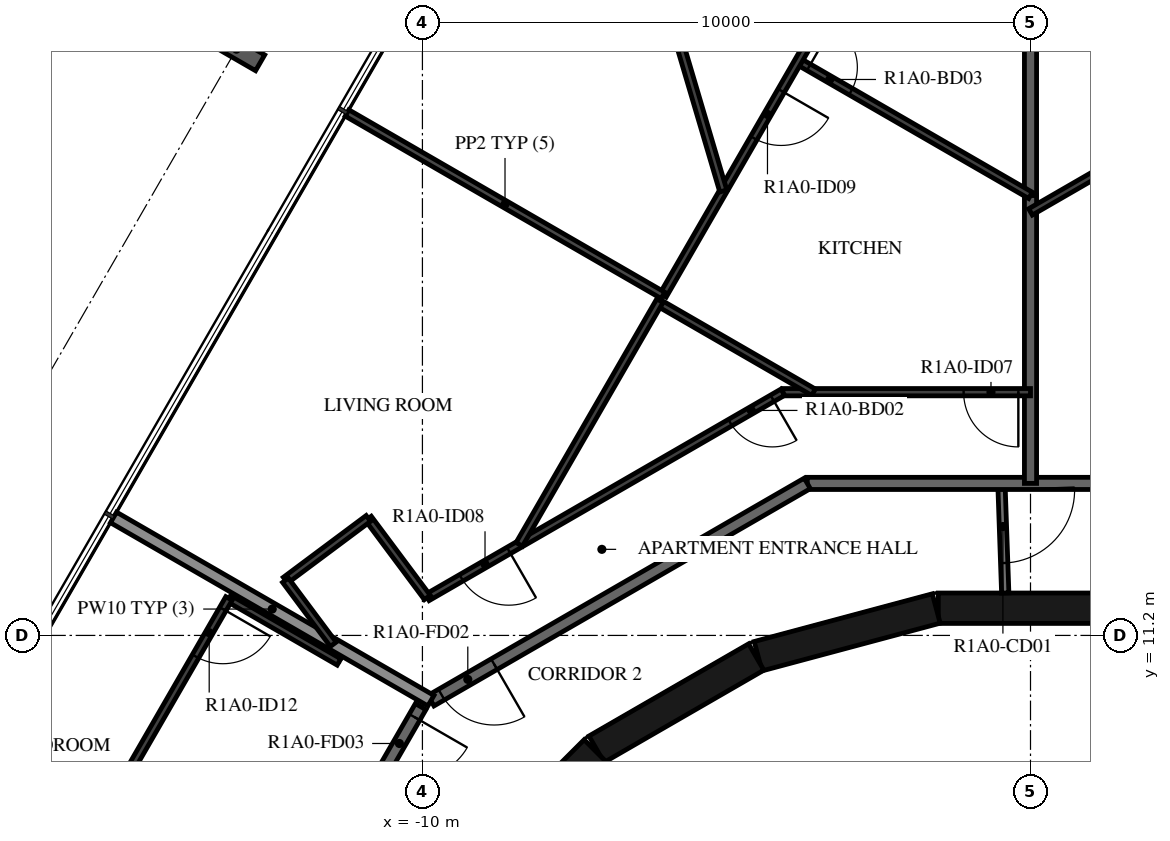
"""IFC4 building model, lengths in metres.
Left out: names, types, materials, properties, quantities, classifications, styles, units other than length and angle.
Written with IfcOpenShell. Run it as: python <this file> out.ifc"""

import sys

from ifc_helpers import new_model, si_unit, direction, frame, frame_2d, origin, origin_2d, place, context, subcontext, project, spatial, rectangle, i_section, extrude, element, fill, save


model = new_model("IFC4")
c1 = context("Model", 3, precision=1e-05, world=origin(), true_north=direction((0.0, 1.0)))
c2 = subcontext(c1, "Body", "Model", "MODEL_VIEW")
j1 = project(units=[si_unit("LENGTHUNIT", "METRE"), si_unit("PLANEANGLEUNIT", "RADIAN")], contexts=[c1])
p1 = place(None, origin())
s1 = spatial("IfcSite", under=j1, at=p1, CompositionType="ELEMENT")
p2 = place(p1, origin())
s2 = spatial("IfcBuilding", under=s1, at=p2, CompositionType="ELEMENT")
p3 = place(p2, frame((0.0, 0.0, 38.4)))
s3 = spatial("IfcBuildingStorey", under=s2, at=p3, CompositionType="ELEMENT", Elevation=38.4)
p4 = place(p3, frame((-13.059, 20.842, -0.45), z_axis=(0.0, 0.0, 1.0), x_axis=(0.50000017485, 0.866025302835, 0.0)))
e1 = element("IfcColumn", 1, at=p4, inside=s3, PredefinedType="COLUMN", context=c2, shape_type="SweptSolid", body=[
    extrude(i_section(OverallWidth=0.3, OverallDepth=0.9, WebThickness=0.019, FlangeThickness=0.035, FilletRadius=0.03, at=origin_2d()), origin(), (0.0, 0.0, 1.0), 3.57),
])
for number, where, z_axis, x_axis in (
    (2, (1.516, 11.647, 0.0), (0.0, 0.0, 1.0), (-1.0, 0.0, 0.0)),
    (3, (-1.55, 11.643, 0.0), (0.0, 0.0, 1.0), (-0.966, -0.259, 0.0)),
    (4, (-4.51, 10.845, 0.0), (0.0, 0.0, 1.0), (-0.866, -0.5, 0.0)),
):
    element("IfcWall", number, at=place(p3, frame(where, z_axis=z_axis, x_axis=x_axis)), inside=s3, PredefinedType="SHEAR", context=c2, shape_type="SweptSolid", body=[
        extrude(rectangle(XDim=3.033, YDim=0.5, at=frame_2d((1.516, 0.0))), origin(), (0.0, 0.0, 1.0), 3.12),
    ])
p5 = place(p3, frame((-7.164, 9.308, 0.0), z_axis=(0.0, 0.0, 1.0), x_axis=(-0.707106781187, -0.707106781187, 0.0)))
e5 = element("IfcWall", 5, at=p5, inside=s3, PredefinedType="SHEAR", context=c2, shape_type="SweptSolid", body=[
    extrude(rectangle(XDim=3.032, YDim=0.5, at=frame_2d((1.516, 0.0))), origin(), (0.0, 0.0, 1.0), 3.12),
])
p6 = place(p5, frame((1.416, 0.0, 0.0)))
e6 = element("IfcOpeningElement", 6, at=p6, cuts=e5, PredefinedType="OPENING", context=c2, shape_type="SweptSolid", body=[
    extrude(rectangle(XDim=1.2, YDim=2.1, at=frame_2d((0.6, 1.05))), frame((0.0, 0.26, 0.0), z_axis=(0.0, -1.0, 0.0), x_axis=(1.0, 0.0, 0.0)), (0.0, 0.0, 1.0), 0.52),
])
p7 = place(p3, frame((-0.479, 13.7, 0.0), z_axis=(0.0, 0.0, 1.0), x_axis=(0.034919103017, -0.999390142159, 0.0)))
e7 = element("IfcWall", 7, at=p7, inside=s3, PredefinedType="PARTITIONING", context=c2, shape_type="SweptSolid", body=[
    extrude(rectangle(XDim=1.804, YDim=0.12, at=frame_2d((0.902, 0.0))), origin(), (0.0, 0.0, 1.0), 3.12),
])
p8 = place(p7, frame((0.11, 0.0, 0.0)))
e8 = element("IfcOpeningElement", 8, at=p8, cuts=e7, PredefinedType="OPENING", context=c2, shape_type="SweptSolid", body=[
    extrude(rectangle(XDim=1.2, YDim=2.1, at=frame_2d((0.6, 1.05))), frame((0.0, 0.07, 0.0), z_axis=(0.0, -1.0, 0.0), x_axis=(1.0, 0.0, 0.0)), (0.0, 0.0, 1.0), 0.14),
])
p9 = place(p3, frame((3.671, 13.7, 0.0), z_axis=(0.0, 0.0, 1.0), x_axis=(-1.0, 0.0, 0.0)))
e9 = element("IfcWall", 9, at=p9, inside=s3, PredefinedType="STANDARD", context=c2, shape_type="SweptSolid", body=[
    extrude(rectangle(XDim=7.342, YDim=0.2, at=frame_2d((3.671, 0.0))), origin(), (0.0, 0.0, 1.0), 3.12),
])
p10 = place(p3, frame((-3.671, 13.7, 0.0), z_axis=(0.0, 0.0, 1.0), x_axis=(-0.866031419417, -0.499989580474, 0.0)))
e10 = element("IfcWall", 10, at=p10, inside=s3, PredefinedType="STANDARD", context=c2, shape_type="SweptSolid", body=[
    extrude(rectangle(XDim=7.147, YDim=0.2, at=frame_2d((3.573, 0.0))), origin(), (0.0, 0.0, 1.0), 3.12),
])
p11 = place(p10, frame((5.947, 0.0, 0.0)))
e11 = element("IfcOpeningElement", 11, at=p11, cuts=e10, PredefinedType="OPENING", context=c2, shape_type="SweptSolid", body=[
    extrude(rectangle(XDim=1.0, YDim=2.1, at=frame_2d((0.5, 1.05))), frame((0.0, 0.11, 0.0), z_axis=(0.0, -1.0, 0.0), x_axis=(1.0, 0.0, 0.0)), (0.0, 0.0, 1.0), 0.22),
])
p12 = place(p3, frame((-10.029, 10.029, 0.0), z_axis=(0.0, 0.0, 1.0), x_axis=(-0.500001669485, -0.866024439905, 0.0)))
e12 = element("IfcWall", 12, at=p12, inside=s3, PredefinedType="STANDARD", context=c2, shape_type="SweptSolid", body=[
    extrude(rectangle(XDim=7.342, YDim=0.2, at=frame_2d((3.671, 0.0))), origin(), (0.0, 0.0, 1.0), 3.12),
])
p13 = place(p12, frame((0.2, 0.0, 0.0)))
e13 = element("IfcOpeningElement", 13, at=p13, cuts=e12, PredefinedType="OPENING", context=c2, shape_type="SweptSolid", body=[
    extrude(rectangle(XDim=1.0, YDim=2.1, at=frame_2d((0.5, 1.05))), frame((0.0, 0.11, 0.0), z_axis=(0.0, -1.0, 0.0), x_axis=(1.0, 0.0, 0.0)), (0.0, 0.0, 1.0), 0.22),
])
p14 = place(p3, frame((0.0, 18.437, 0.0), z_axis=(0.0, 0.0, 1.0), x_axis=(0.0, -1.0, 0.0)))
e14 = element("IfcWall", 14, at=p14, inside=s3, PredefinedType="STANDARD", context=c2, shape_type="SweptSolid", body=[
    extrude(rectangle(XDim=4.737, YDim=0.2, at=frame_2d((2.368, 0.0))), origin(), (0.0, 0.0, 1.0), 3.12),
])
p15 = place(p3, frame((0.0, 21.81, 0.0), z_axis=(0.0, 0.0, 1.0), x_axis=(0.0, -1.0, 0.0)))
e15 = element("IfcWall", 15, at=p15, inside=s3, PredefinedType="STANDARD", context=c2, shape_type="SweptSolid", body=[
    extrude(rectangle(XDim=3.373, YDim=0.2, at=frame_2d((1.687, 0.0))), origin(), (0.0, 0.0, 1.0), 3.12),
])
p16 = place(p3, frame((-15.08, 13.14, 0.0), z_axis=(0.0, 0.0, 1.0), x_axis=(0.86603112331, -0.49999009336, 0.0)))
e16 = element("IfcWall", 16, at=p16, inside=s3, PredefinedType="STANDARD", context=c2, shape_type="SweptSolid", body=[
    extrude(rectangle(XDim=6.027, YDim=0.2, at=frame_2d((3.014, 0.0))), origin(), (0.0, 0.0, 1.0), 2.73),
])
p17 = place(p3, frame((5.324, 21.239, 0.0), z_axis=(0.0, 0.0, 1.0), x_axis=(-0.866030172657, -0.49999173998, 0.0)))
e17 = element("IfcWall", 17, at=p17, inside=s3, PredefinedType="PARTITIONING", context=c2, shape_type="SweptSolid", body=[
    extrude(rectangle(XDim=6.147, YDim=0.12, at=frame_2d((3.074, 0.0))), origin(), (0.0, 0.0, 1.0), 3.12),
])
p18 = place(p17, frame((0.2, 0.0, 0.0)))
e18 = element("IfcOpeningElement", 18, at=p18, cuts=e17, PredefinedType="OPENING", context=c2, shape_type="SweptSolid", body=[
    extrude(rectangle(XDim=0.9, YDim=2.1, at=frame_2d((0.45, 1.05))), frame((0.0, 0.07, 0.0), z_axis=(0.0, -1.0, 0.0), x_axis=(1.0, 0.0, 0.0)), (0.0, 0.0, 1.0), 0.14),
])
p19 = place(p3, frame((0.0, 15.2, 0.0), z_axis=(0.0, 0.0, 1.0), x_axis=(-1.0, 0.0, 0.0)))
e19 = element("IfcWall", 19, at=p19, inside=s3, PredefinedType="PARTITIONING", context=c2, shape_type="SweptSolid", body=[
    extrude(rectangle(XDim=4.073, YDim=0.12, at=frame_2d((2.036, 0.0))), origin(), (0.0, 0.0, 1.0), 3.12),
])
p20 = place(p19, frame((0.2, 0.0, 0.0)))
e20 = element("IfcOpeningElement", 20, at=p20, cuts=e19, PredefinedType="OPENING", context=c2, shape_type="SweptSolid", body=[
    extrude(rectangle(XDim=0.9, YDim=2.1, at=frame_2d((0.45, 1.05))), frame((0.0, 0.07, 0.0), z_axis=(0.0, -1.0, 0.0), x_axis=(1.0, 0.0, 0.0)), (0.0, 0.0, 1.0), 0.14),
])
p21 = place(p3, frame((-4.073, 15.2, 0.0), z_axis=(0.0, 0.0, 1.0), x_axis=(-0.866024802457, -0.500001041529, 0.0)))
e21 = element("IfcWall", 21, at=p21, inside=s3, PredefinedType="PARTITIONING", context=c2, shape_type="SweptSolid", body=[
    extrude(rectangle(XDim=6.751, YDim=0.12, at=frame_2d((3.376, 0.0))), origin(), (0.0, 0.0, 1.0), 3.12),
])
p22 = place(p21, frame((0.2, 0.0, 0.0)))
e22 = element("IfcOpeningElement", 22, at=p22, cuts=e21, PredefinedType="OPENING", context=c2, shape_type="SweptSolid", body=[
    extrude(rectangle(XDim=0.8, YDim=2.1, at=frame_2d((0.4, 1.05))), frame((0.0, 0.07, 0.0), z_axis=(0.0, -1.0, 0.0), x_axis=(1.0, 0.0, 0.0)), (0.0, 0.0, 1.0), 0.14),
])
p23 = place(p21, frame((5.206, 0.0, 0.0)))
e23 = element("IfcOpeningElement", 23, at=p23, cuts=e21, PredefinedType="OPENING", context=c2, shape_type="SweptSolid", body=[
    extrude(rectangle(XDim=0.9, YDim=2.1, at=frame_2d((0.45, 1.05))), frame((0.0, 0.07, 0.0), z_axis=(0.0, -1.0, 0.0), x_axis=(1.0, 0.0, 0.0)), (0.0, 0.0, 1.0), 0.14),
])
p24 = place(p3, frame((-9.92, 11.824, 0.0), z_axis=(0.0, 0.0, 1.0), x_axis=(-0.597853402964, 0.801605456921, 0.0)))
e24 = element("IfcWall", 24, at=p24, inside=s3, PredefinedType="PARTITIONING", context=c2, shape_type="SweptSolid", body=[
    extrude(rectangle(XDim=1.621, YDim=0.12, at=frame_2d((0.811, 0.0))), origin(), (0.0, 0.0, 1.0), 3.12),
])
p25 = place(p3, frame((-10.889, 13.124, 0.0), z_axis=(0.0, 0.0, 1.0), x_axis=(-0.801616976804, -0.597837956724, 0.0)))
e25 = element("IfcWall", 25, at=p25, inside=s3, PredefinedType="PARTITIONING", context=c2, shape_type="SweptSolid", body=[
    extrude(rectangle(XDim=1.7, YDim=0.12, at=frame_2d((0.85, 0.0))), origin(), (0.0, 0.0, 1.0), 3.12),
])
p26 = place(p3, frame((-12.252, 12.107, 0.0), z_axis=(0.0, 0.0, 1.0), x_axis=(0.597827926538, -0.801624457119, 0.0)))
e26 = element("IfcWall", 26, at=p26, inside=s3, PredefinedType="PARTITIONING", context=c2, shape_type="SweptSolid", body=[
    extrude(rectangle(XDim=1.314, YDim=0.12, at=frame_2d((0.657, 0.0))), origin(), (0.0, 0.0, 1.0), 3.12),
])
p27 = place(p3, frame((-3.821, 20.643, 0.0), z_axis=(0.0, 0.0, 1.0), x_axis=(0.866024310165, -0.5000018942, 0.0)))
e27 = element("IfcWall", 27, at=p27, inside=s3, PredefinedType="PARTITIONING", context=c2, shape_type="SweptSolid", body=[
    extrude(rectangle(XDim=4.412, YDim=0.12, at=frame_2d((2.206, 0.0))), origin(), (0.0, 0.0, 1.0), 3.12),
])
p28 = place(p27, frame((0.2, 0.0, 0.0)))
e28 = element("IfcOpeningElement", 28, at=p28, cuts=e27, PredefinedType="OPENING", context=c2, shape_type="SweptSolid", body=[
    extrude(rectangle(XDim=0.8, YDim=2.1, at=frame_2d((0.4, 1.05))), frame((0.0, 0.07, 0.0), z_axis=(0.0, -1.0, 0.0), x_axis=(1.0, 0.0, 0.0)), (0.0, 0.0, 1.0), 0.14),
])
p29 = place(p3, frame((-1.907, 23.957, 0.0), z_axis=(0.0, 0.0, 1.0), x_axis=(-0.499994901178, -0.866028347571, 0.0)))
e29 = element("IfcWall", 29, at=p29, inside=s3, PredefinedType="PARTITIONING", context=c2, shape_type="SweptSolid", body=[
    extrude(rectangle(XDim=8.274, YDim=0.12, at=frame_2d((4.137, 0.0))), origin(), (0.0, 0.0, 1.0), 3.12),
])
p30 = place(p29, frame((4.387, 0.0, 0.0)))
e30 = element("IfcOpeningElement", 30, at=p30, cuts=e29, PredefinedType="OPENING", context=c2, shape_type="SweptSolid", body=[
    extrude(rectangle(XDim=0.9, YDim=2.1, at=frame_2d((0.45, 1.05))), frame((0.0, 0.07, 0.0), z_axis=(0.0, -1.0, 0.0), x_axis=(1.0, 0.0, 0.0)), (0.0, 0.0, 1.0), 0.14),
])
p31 = place(p3, frame((-6.114, 16.67, 0.0), z_axis=(0.0, 0.0, 1.0), x_axis=(0.866011328839, -0.500024377727, 0.0)))
e31 = element("IfcWall", 31, at=p31, inside=s3, PredefinedType="PARTITIONING", context=c2, shape_type="SweptSolid", body=[
    extrude(rectangle(XDim=2.94, YDim=0.12, at=frame_2d((1.47, 0.0))), origin(), (0.0, 0.0, 1.0), 3.12),
])
p32 = place(p3, frame((-7.4, 26.443, 0.0), z_axis=(0.0, 0.0, 1.0), x_axis=(0.283777867447, -0.95889004685, 0.0)))
e32 = element("IfcWall", 32, at=p32, inside=s3, PredefinedType="PARTITIONING", context=c2, shape_type="SweptSolid", body=[
    extrude(rectangle(XDim=8.274, YDim=0.12, at=frame_2d((4.137, 0.0))), origin(), (0.0, 0.0, 1.0), 3.12),
])
p33 = place(p32, frame((0.8, 0.0, 0.0)))
e33 = element("IfcOpeningElement", 33, at=p33, cuts=e32, PredefinedType="OPENING", context=c2, shape_type="SweptSolid", body=[
    extrude(rectangle(XDim=0.9, YDim=2.1, at=frame_2d((0.45, 1.05))), frame((0.0, 0.07, 0.0), z_axis=(0.0, -1.0, 0.0), x_axis=(1.0, 0.0, 0.0)), (0.0, 0.0, 1.0), 0.14),
])
p34 = place(p3, frame((-11.24, 19.792, 0.0), z_axis=(0.0, 0.0, 1.0), x_axis=(0.866031096941, -0.499990139034, 0.0)))
e34 = element("IfcWall", 34, at=p34, inside=s3, PredefinedType="PARTITIONING", context=c2, shape_type="SweptSolid", body=[
    extrude(rectangle(XDim=6.0, YDim=0.12, at=frame_2d((3.0, 0.0))), origin(), (0.0, 0.0, 1.0), 2.73),
])
p35 = place(p3, frame((-6.094, 16.705, 0.0), z_axis=(0.0, 0.0, 1.0), x_axis=(-0.500014747178, -0.86601688933, 0.0)))
e35 = element("IfcWall", 35, at=p35, inside=s3, PredefinedType="PARTITIONING", context=c2, shape_type="SweptSolid", body=[
    extrude(rectangle(XDim=4.627, YDim=0.12, at=frame_2d((2.313, 0.0))), origin(), (0.0, 0.0, 1.0), 3.12),
])
p36 = place(p3, frame((-11.372, 10.763, 0.0), z_axis=(0.0, 0.0, 1.0), x_axis=(-0.866041603473, 0.499971940267, 0.0)))
e36 = element("IfcWall", 36, at=p36, inside=s3, PredefinedType="PARTITIONING", context=c2, shape_type="SweptSolid", body=[
    extrude(rectangle(XDim=2.089, YDim=0.12, at=frame_2d((1.045, 0.0))), origin(), (0.0, 0.0, 1.0), 3.12),
])
p37 = place(p3, frame((-13.181, 11.808, 0.0), z_axis=(0.0, 0.0, 1.0), x_axis=(-0.50002983664, -0.866008176907, 0.0)))
e37 = element("IfcWall", 37, at=p37, inside=s3, PredefinedType="PARTITIONING", context=c2, shape_type="SweptSolid", body=[
    extrude(rectangle(XDim=4.4, YDim=0.12, at=frame_2d((2.2, 0.0))), origin(), (0.0, 0.0, 1.0), 3.12),
])
p38 = place(p37, frame((0.2, 0.0, 0.0)))
e38 = element("IfcOpeningElement", 38, at=p38, cuts=e37, PredefinedType="OPENING", context=c2, shape_type="SweptSolid", body=[
    extrude(rectangle(XDim=0.9, YDim=2.1, at=frame_2d((0.45, 1.05))), frame((0.0, 0.07, 0.0), z_axis=(0.0, -1.0, 0.0), x_axis=(1.0, 0.0, 0.0)), (0.0, 0.0, 1.0), 0.14),
])
p39 = place(p11, origin())
e39 = element("IfcDoor", 39, at=p39, inside=s3, OperationType="SINGLE_SWING_LEFT", PredefinedType="DOOR", context=c2, shape_type="SweptSolid", body=[
    extrude(rectangle(XDim=1.0, YDim=2.1, at=frame_2d((0.5, 1.05))), frame((0.0, 0.025, 0.0), z_axis=(0.0, -1.0, 0.0), x_axis=(1.0, 0.0, 0.0)), (0.0, 0.0, 1.0), 0.05),
])
fill(e11, e39)
p40 = place(p20, origin())
e40 = element("IfcDoor", 40, at=p40, inside=s3, OperationType="SINGLE_SWING_RIGHT", PredefinedType="DOOR", context=c2, shape_type="SweptSolid", body=[
    extrude(rectangle(XDim=0.9, YDim=2.1, at=frame_2d((0.45, 1.05))), frame((0.0, 0.025, 0.0), z_axis=(0.0, -1.0, 0.0), x_axis=(1.0, 0.0, 0.0)), (0.0, 0.0, 1.0), 0.05),
])
fill(e20, e40)
p41 = place(p22, origin())
e41 = element("IfcDoor", 41, at=p41, inside=s3, OperationType="SINGLE_SWING_LEFT", PredefinedType="DOOR", context=c2, shape_type="SweptSolid", body=[
    extrude(rectangle(XDim=0.8, YDim=2.1, at=frame_2d((0.4, 1.05))), frame((0.0, 0.025, 0.0), z_axis=(0.0, -1.0, 0.0), x_axis=(1.0, 0.0, 0.0)), (0.0, 0.0, 1.0), 0.05),
])
fill(e22, e41)
p42 = place(p23, origin())
e42 = element("IfcDoor", 42, at=p42, inside=s3, OperationType="SINGLE_SWING_LEFT", PredefinedType="DOOR", context=c2, shape_type="SweptSolid", body=[
    extrude(rectangle(XDim=0.9, YDim=2.1, at=frame_2d((0.45, 1.05))), frame((0.0, 0.025, 0.0), z_axis=(0.0, -1.0, 0.0), x_axis=(1.0, 0.0, 0.0)), (0.0, 0.0, 1.0), 0.05),
])
fill(e23, e42)
p43 = place(p28, origin())
e43 = element("IfcDoor", 43, at=p43, inside=s3, OperationType="SINGLE_SWING_LEFT", PredefinedType="DOOR", context=c2, shape_type="SweptSolid", body=[
    extrude(rectangle(XDim=0.8, YDim=2.1, at=frame_2d((0.4, 1.05))), frame((0.0, 0.025, 0.0), z_axis=(0.0, -1.0, 0.0), x_axis=(1.0, 0.0, 0.0)), (0.0, 0.0, 1.0), 0.05),
])
fill(e28, e43)
p44 = place(p30, origin())
e44 = element("IfcDoor", 44, at=p44, inside=s3, OperationType="SINGLE_SWING_LEFT", PredefinedType="DOOR", context=c2, shape_type="SweptSolid", body=[
    extrude(rectangle(XDim=0.9, YDim=2.1, at=frame_2d((0.45, 1.05))), frame((0.0, 0.025, 0.0), z_axis=(0.0, -1.0, 0.0), x_axis=(1.0, 0.0, 0.0)), (0.0, 0.0, 1.0), 0.05),
])
fill(e30, e44)
p45 = place(p13, origin())
e45 = element("IfcDoor", 45, at=p45, inside=s3, OperationType="SINGLE_SWING_LEFT", PredefinedType="DOOR", context=c2, shape_type="SweptSolid", body=[
    extrude(rectangle(XDim=1.0, YDim=2.1, at=frame_2d((0.5, 1.05))), frame((0.0, 0.025, 0.0), z_axis=(0.0, -1.0, 0.0), x_axis=(1.0, 0.0, 0.0)), (0.0, 0.0, 1.0), 0.05),
])
fill(e13, e45)
p46 = place(p38, origin())
e46 = element("IfcDoor", 46, at=p46, inside=s3, OperationType="SINGLE_SWING_LEFT", PredefinedType="DOOR", context=c2, shape_type="SweptSolid", body=[
    extrude(rectangle(XDim=0.9, YDim=2.1, at=frame_2d((0.45, 1.05))), frame((0.0, 0.025, 0.0), z_axis=(0.0, -1.0, 0.0), x_axis=(1.0, 0.0, 0.0)), (0.0, 0.0, 1.0), 0.05),
])
fill(e38, e46)
p47 = place(p8, origin())
e47 = element("IfcDoor", 47, at=p47, inside=s3, OperationType="DOUBLE_DOOR_SINGLE_SWING", PredefinedType="DOOR", context=c2, shape_type="SweptSolid", body=[
    extrude(rectangle(XDim=1.2, YDim=2.1, at=frame_2d((0.6, 1.05))), frame((0.0, 0.025, 0.0), z_axis=(0.0, -1.0, 0.0), x_axis=(1.0, 0.0, 0.0)), (0.0, 0.0, 1.0), 0.05),
])
fill(e8, e47)
save(model, sys.argv[1])
